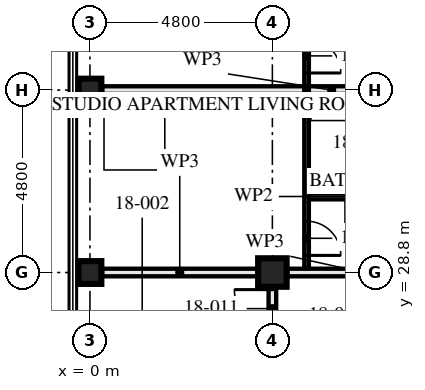
"""IFC4 building model, lengths in metres.
Left out: names, types, materials, properties, quantities, classifications, styles, units other than length and angle.
Written with IfcOpenShell. Run it as: python <this file> out.ifc"""

import sys

from ifc_helpers import new_model, si_unit, direction, frame, frame_2d, origin, origin_2d, place, context, subcontext, project, spatial, rectangle, hollow_rectangle, extrude, element, fill, save


model = new_model("IFC4")
c1 = context("Model", 3, precision=1e-05, world=origin(), true_north=direction((0.0, 1.0)))
c2 = subcontext(c1, "Body", "Model", "MODEL_VIEW")
j1 = project(units=[si_unit("LENGTHUNIT", "METRE"), si_unit("PLANEANGLEUNIT", "RADIAN")], contexts=[c1])
p1 = place(None, origin())
s1 = spatial("IfcSite", under=j1, at=p1, CompositionType="ELEMENT")
p2 = place(p1, origin())
s2 = spatial("IfcBuilding", under=s1, at=p2, CompositionType="ELEMENT")
p3 = place(p2, frame((0.0, 0.0, 69.0)))
s3 = spatial("IfcBuildingStorey", under=s2, at=p3, CompositionType="ELEMENT", Elevation=69.0)
for number, where, z_axis, x_axis in (
    (1, (0.0, 28.8, 0.0), (0.0, 0.0, 1.0), (0.0, 1.0, 0.0)),
    (2, (0.0, 33.6, 0.0), (0.0, 0.0, 1.0), (1.0, 0.0, 0.0)),
):
    element("IfcColumn", number, at=place(p3, frame(where, z_axis=z_axis, x_axis=x_axis)), inside=s3, PredefinedType="COLUMN", context=c2, shape_type="SweptSolid", body=[
        extrude(hollow_rectangle(XDim=0.6, YDim=0.6, WallThickness=0.08, at=origin_2d()), origin(), (0.0, 0.0, 1.0), 3.5),
    ])
p4 = place(p3, frame((4.8, 28.8, 0.0), z_axis=(0.0, 0.0, 1.0), x_axis=(0.0, 1.0, 0.0)))
e3 = element("IfcColumn", 3, at=p4, inside=s3, PredefinedType="COLUMN", context=c2, shape_type="SweptSolid", body=[
    extrude(hollow_rectangle(XDim=0.75, YDim=0.75, WallThickness=0.08, at=origin_2d()), origin(), (0.0, 0.0, 1.0), 3.5),
])
p5 = place(p3, frame((4.8, 26.8, 0.0), z_axis=(0.0, 0.0, 1.0), x_axis=(0.0, 1.0, 0.0)))
e4 = element("IfcWall", 4, at=p5, inside=s3, PredefinedType="PARTITIONING", context=c2, shape_type="SweptSolid", body=[
    extrude(rectangle(XDim=1.605, YDim=0.2, at=frame_2d((0.802, 0.0))), origin(), (0.0, 0.0, 1.0), 3.33),
])
p6 = place(p5, frame((0.55, 0.0, 0.0)))
e5 = element("IfcOpeningElement", 5, at=p6, cuts=e4, PredefinedType="OPENING", context=c2, shape_type="SweptSolid", body=[
    extrude(rectangle(XDim=1.0, YDim=2.1, at=frame_2d((0.5, 1.05))), frame((0.0, 0.111, 0.0), z_axis=(0.0, -1.0, 0.0), x_axis=(1.0, 0.0, 0.0)), (0.0, 0.0, 1.0), 0.221),
])
p7 = place(p3, frame((5.7, 38.4, 0.0), z_axis=(0.0, 0.0, 1.0), x_axis=(0.0, -1.0, 0.0)))
e6 = element("IfcWall", 6, at=p7, inside=s3, PredefinedType="PARTITIONING", context=c2, shape_type="SweptSolid", body=[
    extrude(rectangle(XDim=4.8, YDim=0.12, at=frame_2d((2.4, 0.0))), origin(), (0.0, 0.0, 1.0), 3.33),
])
p8 = place(p7, frame((3.45, 0.0, 0.0)))
e7 = element("IfcOpeningElement", 7, at=p8, cuts=e6, PredefinedType="OPENING", context=c2, shape_type="SweptSolid", body=[
    extrude(rectangle(XDim=0.9, YDim=2.1, at=frame_2d((0.45, 1.05))), frame((0.0, 0.071, 0.0), z_axis=(0.0, -1.0, 0.0), x_axis=(1.0, 0.0, 0.0)), (0.0, 0.0, 1.0), 0.141),
])
p9 = place(p3, frame((0.32, 33.6, 0.0), z_axis=(0.0, 0.0, 1.0), x_axis=(1.0, 0.0, 0.0)))
e8 = element("IfcWall", 8, at=p9, inside=s3, PredefinedType="PARTITIONING", context=c2, shape_type="SweptSolid", body=[
    extrude(rectangle(XDim=12.08, YDim=0.2, at=frame_2d((6.04, 0.0))), origin(), (0.0, 0.0, 1.0), 2.55),
])
p10 = place(p3, frame((5.7, 30.8, 0.0), z_axis=(0.0, 0.0, 1.0), x_axis=(1.0, 0.0, 0.0)))
e9 = element("IfcWall", 9, at=p10, inside=s3, PredefinedType="PARTITIONING", context=c2, shape_type="SweptSolid", body=[
    extrude(rectangle(XDim=3.0, YDim=0.15, at=frame_2d((1.5, 0.0))), origin(), (0.0, 0.0, 1.0), 3.33),
])
p11 = place(p3, frame((5.7, 33.6, 0.0), z_axis=(0.0, 0.0, 1.0), x_axis=(0.0, -1.0, 0.0)))
e10 = element("IfcWall", 10, at=p11, inside=s3, PredefinedType="PARTITIONING", context=c2, shape_type="SweptSolid", body=[
    extrude(rectangle(XDim=4.8, YDim=0.12, at=frame_2d((2.4, 0.0))), origin(), (0.0, 0.0, 1.0), 3.33),
])
p12 = place(p11, frame((3.45, 0.0, 0.0)))
e11 = element("IfcOpeningElement", 11, at=p12, cuts=e10, PredefinedType="OPENING", context=c2, shape_type="SweptSolid", body=[
    extrude(rectangle(XDim=0.9, YDim=2.1, at=frame_2d((0.45, 1.05))), frame((0.0, 0.071, 0.0), z_axis=(0.0, -1.0, 0.0), x_axis=(1.0, 0.0, 0.0)), (0.0, 0.0, 1.0), 0.141),
])
p13 = place(p3, frame((9.205, 28.8, 0.0), z_axis=(0.0, 0.0, 1.0), x_axis=(-1.0, 0.0, 0.0)))
e12 = element("IfcWall", 12, at=p13, inside=s3, PredefinedType="PARTITIONING", context=c2, shape_type="SweptSolid", body=[
    extrude(rectangle(XDim=4.01, YDim=0.2, at=frame_2d((2.005, 0.0))), origin(), (0.0, 0.0, 1.0), 2.32),
])
p14 = place(p3, frame((4.405, 28.8, 0.0), z_axis=(0.0, 0.0, 1.0), x_axis=(-1.0, 0.0, 0.0)))
e13 = element("IfcWall", 13, at=p14, inside=s3, PredefinedType="PARTITIONING", context=c2, shape_type="SweptSolid", body=[
    extrude(rectangle(XDim=4.085, YDim=0.2, at=frame_2d((2.042, 0.0))), origin(), (0.0, 0.0, 1.0), 2.32),
])
p15 = place(p6, origin())
e14 = element("IfcDoor", 14, at=p15, inside=s3, OperationType="SINGLE_SWING_LEFT", PredefinedType="DOOR", context=c2, shape_type="SweptSolid", body=[
    extrude(rectangle(XDim=1.0, YDim=2.1, at=frame_2d((0.5, 1.05))), frame((0.0, 0.027, 0.0), z_axis=(0.0, -1.0, 0.0), x_axis=(1.0, 0.0, 0.0)), (0.0, 0.0, 1.0), 0.054),
])
fill(e5, e14)
p16 = place(p8, origin())
e15 = element("IfcDoor", 15, at=p16, inside=s3, OperationType="SINGLE_SWING_LEFT", PredefinedType="DOOR", context=c2, shape_type="SweptSolid", body=[
    extrude(rectangle(XDim=0.9, YDim=2.1, at=frame_2d((0.45, 1.05))), frame((0.0, 0.022, 0.0), z_axis=(0.0, -1.0, 0.0), x_axis=(1.0, 0.0, 0.0)), (0.0, 0.0, 1.0), 0.044),
])
fill(e7, e15)
p17 = place(p12, origin())
e16 = element("IfcDoor", 16, at=p17, inside=s3, OperationType="SINGLE_SWING_LEFT", PredefinedType="DOOR", context=c2, shape_type="SweptSolid", body=[
    extrude(rectangle(XDim=0.9, YDim=2.1, at=frame_2d((0.45, 1.05))), frame((0.0, 0.022, 0.0), z_axis=(0.0, -1.0, 0.0), x_axis=(1.0, 0.0, 0.0)), (0.0, 0.0, 1.0), 0.044),
])
fill(e11, e16)
save(model, sys.argv[1])
